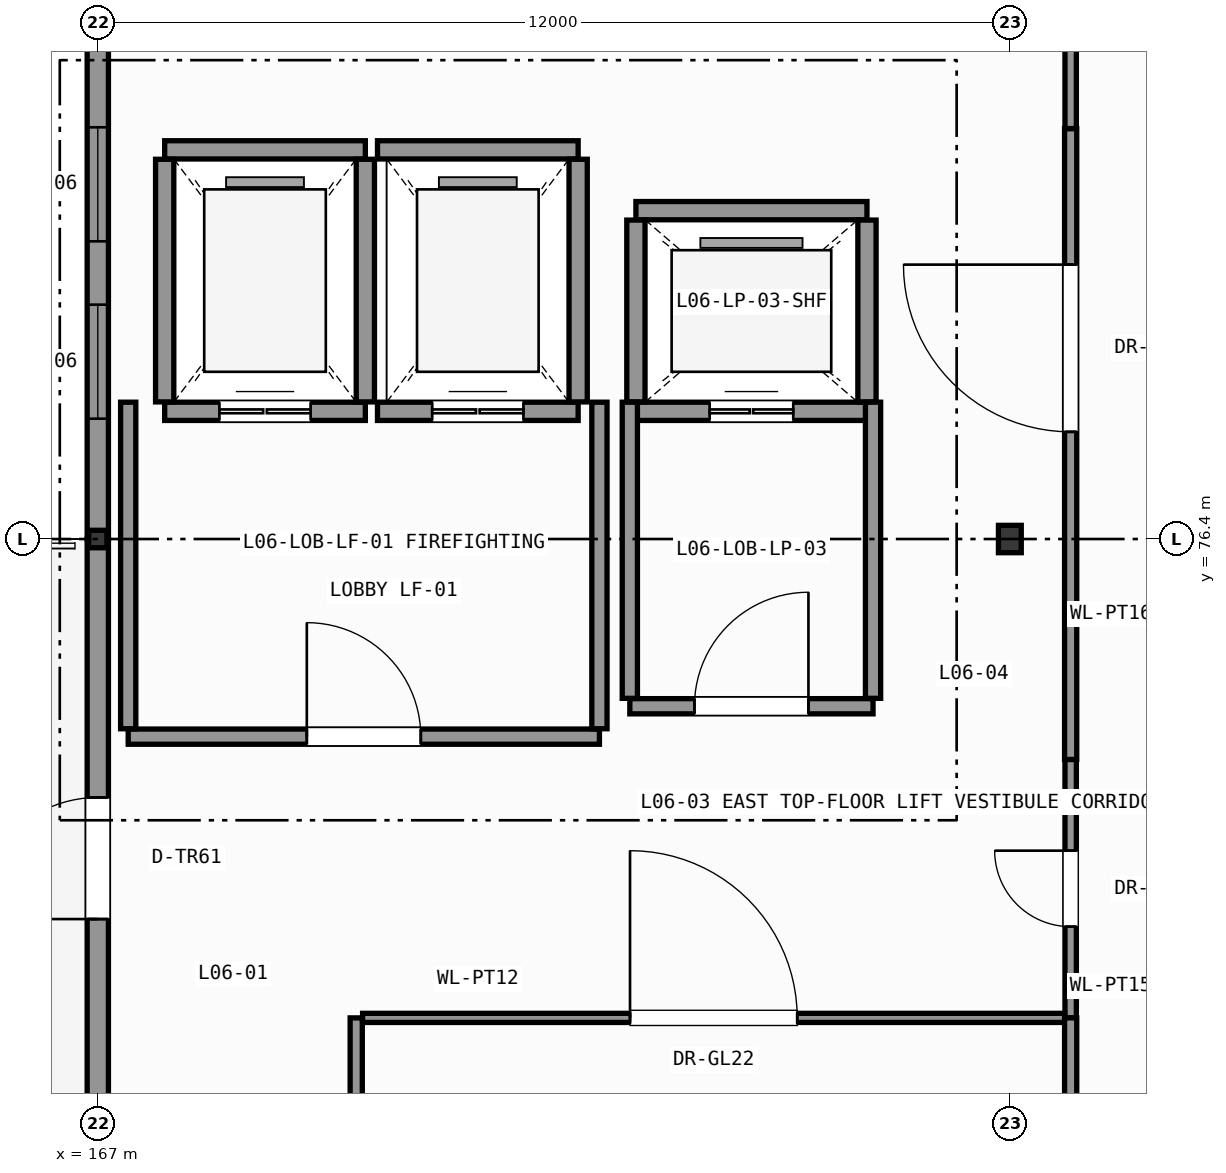
"""IFC4 building model, lengths in metres.
Left out: names, types, materials, properties, quantities, classifications, styles, units other than length and angle.
Written with IfcOpenShell. Run it as: python <this file> out.ifc"""

import sys

from ifc_helpers import new_model, si_unit, direction, frame, frame_2d, origin, origin_2d, place, context, subcontext, project, spatial, rectangle, i_section, extrude, element, fill, save


model = new_model("IFC4")
c1 = context("Model", 3, precision=1e-05, world=origin(), true_north=direction((0.0, 1.0)))
c2 = subcontext(c1, "Body", "Model", "MODEL_VIEW")
j1 = project(units=[si_unit("LENGTHUNIT", "METRE"), si_unit("PLANEANGLEUNIT", "RADIAN")], contexts=[c1])
p1 = place(None, origin())
s1 = spatial("IfcSite", under=j1, at=p1, CompositionType="ELEMENT")
p2 = place(p1, origin())
s2 = spatial("IfcBuilding", under=s1, at=p2, CompositionType="ELEMENT")
p3 = place(p2, frame((0.0, 0.0, 26.4)))
s3 = spatial("IfcBuildingStorey", under=s2, at=p3, CompositionType="ELEMENT", Elevation=26.4)
p4 = place(p3, frame((167.0, 76.4, 0.0), z_axis=(0.0, 0.0, 1.0), x_axis=(1.0, 0.0, 0.0)))
e1 = element("IfcColumn", 1, at=p4, inside=s3, PredefinedType="COLUMN", context=c2, shape_type="SweptSolid", body=[
    extrude(i_section(OverallWidth=0.24, OverallDepth=0.23, WebThickness=0.008, FlangeThickness=0.012, FilletRadius=0.021, at=origin_2d()), origin(), (0.0, 0.0, 1.0), 4.2),
])
p5 = place(p3, frame((179.0, 76.4, 0.0), z_axis=(0.0, 0.0, 1.0), x_axis=(1.0, 0.0, 0.0)))
e2 = element("IfcColumn", 2, at=p5, inside=s3, PredefinedType="COLUMN", context=c2, shape_type="SweptSolid", body=[
    extrude(i_section(OverallWidth=0.3, OverallDepth=0.36, WebThickness=0.012, FlangeThickness=0.022, FilletRadius=0.027, at=origin_2d()), origin(), (0.0, 0.0, 1.0), 4.2),
])
p6 = place(p3, frame((167.0, 76.4, 0.0), z_axis=(0.0, 0.0, 1.0), x_axis=(0.0, 1.0, 0.0)))
e3 = element("IfcWall", 3, at=p6, inside=s3, PredefinedType="SOLIDWALL", context=c2, shape_type="SweptSolid", body=[
    extrude(rectangle(XDim=7.0, YDim=0.28, at=frame_2d((3.5, 0.0))), origin(), (0.0, 0.0, 1.0), 3.695),
])
p7 = place(p6, frame((1.583, 0.0, 0.95)))
e4 = element("IfcOpeningElement", 4, at=p7, cuts=e3, PredefinedType="OPENING", context=c2, shape_type="SweptSolid", body=[
    extrude(rectangle(XDim=1.5, YDim=2.35, at=frame_2d((0.75, 1.175))), frame((0.0, 0.15, 0.0), z_axis=(0.0, -1.0, 0.0), x_axis=(1.0, 0.0, 0.0)), (0.0, 0.0, 1.0), 0.3),
])
p8 = place(p6, frame((3.917, 0.0, 0.95)))
e5 = element("IfcOpeningElement", 5, at=p8, cuts=e3, PredefinedType="OPENING", context=c2, shape_type="SweptSolid", body=[
    extrude(rectangle(XDim=1.5, YDim=2.35, at=frame_2d((0.75, 1.175))), frame((0.0, 0.15, 0.0), z_axis=(0.0, -1.0, 0.0), x_axis=(1.0, 0.0, 0.0)), (0.0, 0.0, 1.0), 0.3),
])
p9 = place(p3, frame((167.0, 68.0, 0.0), z_axis=(0.0, 0.0, 1.0), x_axis=(0.0, 1.0, 0.0)))
e6 = element("IfcWall", 6, at=p9, inside=s3, PredefinedType="SOLIDWALL", context=c2, shape_type="SweptSolid", body=[
    extrude(rectangle(XDim=8.4, YDim=0.28, at=frame_2d((4.2, 0.0))), origin(), (0.0, 0.0, 1.0), 3.545),
])
p10 = place(p9, frame((3.4, 0.0, 0.0)))
e7 = element("IfcOpeningElement", 7, at=p10, cuts=e6, PredefinedType="OPENING", context=c2, shape_type="SweptSolid", body=[
    extrude(rectangle(XDim=1.6, YDim=2.4, at=frame_2d((0.8, 1.2))), frame((0.0, 0.15, 0.0), z_axis=(0.0, -1.0, 0.0), x_axis=(1.0, 0.0, 0.0)), (0.0, 0.0, 1.0), 0.3),
])
p11 = place(p3, frame((167.88, 78.08, 0.0), z_axis=(0.0, 0.0, 1.0), x_axis=(1.0, 0.0, 0.0)))
e8 = element("IfcWall", 8, at=p11, inside=s3, PredefinedType="SHEAR", context=c2, shape_type="SweptSolid", body=[
    extrude(rectangle(XDim=2.64, YDim=0.24, at=frame_2d((1.32, 0.0))), origin(), (0.0, 0.0, 1.0), 4.0),
])
p12 = place(p11, frame((0.72, 0.0, 0.0)))
e9 = element("IfcOpeningElement", 9, at=p12, cuts=e8, PredefinedType="OPENING", context=c2, shape_type="SweptSolid", body=[
    extrude(rectangle(XDim=1.2, YDim=2.2, at=frame_2d((0.6, 1.1))), frame((0.0, 0.13, 0.0), z_axis=(0.0, -1.0, 0.0), x_axis=(1.0, 0.0, 0.0)), (0.0, 0.0, 1.0), 0.26),
])
p13 = place(p3, frame((167.88, 81.52, 0.0), z_axis=(0.0, 0.0, 1.0), x_axis=(1.0, 0.0, 0.0)))
e10 = element("IfcWall", 10, at=p13, inside=s3, PredefinedType="SHEAR", context=c2, shape_type="SweptSolid", body=[
    extrude(rectangle(XDim=2.64, YDim=0.24, at=frame_2d((1.32, 0.0))), origin(), (0.0, 0.0, 1.0), 4.0),
])
for number, where, z_axis, x_axis in (
    (11, (167.88, 78.204, 0.0), (0.0, 0.0, 1.0), (0.0, 1.0, 0.0)),
    (12, (170.52, 78.204, 0.0), (0.0, 0.0, 1.0), (0.0, 1.0, 0.0)),
):
    element("IfcWall", number, at=place(p3, frame(where, z_axis=z_axis, x_axis=x_axis)), inside=s3, PredefinedType="SHEAR", context=c2, shape_type="SweptSolid", body=[
        extrude(rectangle(XDim=3.192, YDim=0.24, at=frame_2d((1.596, 0.0))), origin(), (0.0, 0.0, 1.0), 4.0),
    ])
p14 = place(p3, frame((170.68, 78.08, 0.0), z_axis=(0.0, 0.0, 1.0), x_axis=(1.0, 0.0, 0.0)))
e13 = element("IfcWall", 13, at=p14, inside=s3, PredefinedType="SHEAR", context=c2, shape_type="SweptSolid", body=[
    extrude(rectangle(XDim=2.64, YDim=0.24, at=frame_2d((1.32, 0.0))), origin(), (0.0, 0.0, 1.0), 4.0),
])
p15 = place(p14, frame((0.72, 0.0, 0.0)))
e14 = element("IfcOpeningElement", 14, at=p15, cuts=e13, PredefinedType="OPENING", context=c2, shape_type="SweptSolid", body=[
    extrude(rectangle(XDim=1.2, YDim=2.2, at=frame_2d((0.6, 1.1))), frame((0.0, 0.13, 0.0), z_axis=(0.0, -1.0, 0.0), x_axis=(1.0, 0.0, 0.0)), (0.0, 0.0, 1.0), 0.26),
])
p16 = place(p3, frame((170.68, 81.52, 0.0), z_axis=(0.0, 0.0, 1.0), x_axis=(1.0, 0.0, 0.0)))
e15 = element("IfcWall", 15, at=p16, inside=s3, PredefinedType="SHEAR", context=c2, shape_type="SweptSolid", body=[
    extrude(rectangle(XDim=2.64, YDim=0.24, at=frame_2d((1.32, 0.0))), origin(), (0.0, 0.0, 1.0), 4.0),
])
p17 = place(p3, frame((173.32, 78.204, 0.0), z_axis=(0.0, 0.0, 1.0), x_axis=(0.0, 1.0, 0.0)))
e16 = element("IfcWall", 16, at=p17, inside=s3, PredefinedType="SHEAR", context=c2, shape_type="SweptSolid", body=[
    extrude(rectangle(XDim=3.192, YDim=0.24, at=frame_2d((1.596, 0.0))), origin(), (0.0, 0.0, 1.0), 4.0),
])
p18 = place(p3, frame((174.08, 78.08, 0.0), z_axis=(0.0, 0.0, 1.0), x_axis=(1.0, 0.0, 0.0)))
e17 = element("IfcWall", 17, at=p18, inside=s3, PredefinedType="SHEAR", context=c2, shape_type="SweptSolid", body=[
    extrude(rectangle(XDim=3.04, YDim=0.24, at=frame_2d((1.52, 0.0))), origin(), (0.0, 0.0, 1.0), 4.0),
])
p19 = place(p18, frame((0.97, 0.0, 0.0)))
e18 = element("IfcOpeningElement", 18, at=p19, cuts=e17, PredefinedType="OPENING", context=c2, shape_type="SweptSolid", body=[
    extrude(rectangle(XDim=1.1, YDim=2.2, at=frame_2d((0.55, 1.1))), frame((0.0, 0.13, 0.0), z_axis=(0.0, -1.0, 0.0), x_axis=(1.0, 0.0, 0.0)), (0.0, 0.0, 1.0), 0.26),
])
p20 = place(p3, frame((174.08, 80.72, 0.0), z_axis=(0.0, 0.0, 1.0), x_axis=(1.0, 0.0, 0.0)))
e19 = element("IfcWall", 19, at=p20, inside=s3, PredefinedType="SHEAR", context=c2, shape_type="SweptSolid", body=[
    extrude(rectangle(XDim=3.04, YDim=0.24, at=frame_2d((1.52, 0.0))), origin(), (0.0, 0.0, 1.0), 4.0),
])
for number, where, z_axis, x_axis in (
    (20, (174.08, 78.204, 0.0), (0.0, 0.0, 1.0), (0.0, 1.0, 0.0)),
    (21, (177.12, 78.204, 0.0), (0.0, 0.0, 1.0), (0.0, 1.0, 0.0)),
):
    element("IfcWall", number, at=place(p3, frame(where, z_axis=z_axis, x_axis=x_axis)), inside=s3, PredefinedType="SHEAR", context=c2, shape_type="SweptSolid", body=[
        extrude(rectangle(XDim=2.392, YDim=0.24, at=frame_2d((1.196, 0.0))), origin(), (0.0, 0.0, 1.0), 4.0),
    ])
p21 = place(p3, frame((167.4, 73.8, 0.0), z_axis=(0.0, 0.0, 1.0), x_axis=(1.0, 0.0, 0.0)))
e22 = element("IfcWall", 22, at=p21, inside=s3, PredefinedType="PARTITIONING", context=c2, shape_type="SweptSolid", body=[
    extrude(rectangle(XDim=6.2, YDim=0.2, at=frame_2d((3.1, 0.0))), origin(), (0.0, 0.0, 1.0), 3.625),
])
p22 = place(p21, frame((2.35, 0.0, 0.0)))
e23 = element("IfcOpeningElement", 23, at=p22, cuts=e22, PredefinedType="OPENING", context=c2, shape_type="SweptSolid", body=[
    extrude(rectangle(XDim=1.5, YDim=2.2, at=frame_2d((0.75, 1.1))), frame((0.0, 0.11, 0.0), z_axis=(0.0, -1.0, 0.0), x_axis=(1.0, 0.0, 0.0)), (0.0, 0.0, 1.0), 0.22),
])
for number, where, z_axis, x_axis in (
    (24, (167.4, 73.904, 0.0), (0.0, 0.0, 1.0), (0.0, 1.0, 0.0)),
    (25, (173.6, 73.904, 0.0), (0.0, 0.0, 1.0), (0.0, 1.0, 0.0)),
):
    element("IfcWall", number, at=place(p3, frame(where, z_axis=z_axis, x_axis=x_axis)), inside=s3, PredefinedType="PARTITIONING", context=c2, shape_type="SweptSolid", body=[
        extrude(rectangle(XDim=4.296, YDim=0.2, at=frame_2d((2.148, 0.0))), origin(), (0.0, 0.0, 1.0), 4.0),
    ])
p23 = place(p3, frame((174.0, 74.2, 0.0), z_axis=(0.0, 0.0, 1.0), x_axis=(1.0, 0.0, 0.0)))
e26 = element("IfcWall", 26, at=p23, inside=s3, PredefinedType="PARTITIONING", context=c2, shape_type="SweptSolid", body=[
    extrude(rectangle(XDim=3.2, YDim=0.2, at=frame_2d((1.6, 0.0))), origin(), (0.0, 0.0, 1.0), 4.0),
])
p24 = place(p23, frame((0.85, 0.0, 0.0)))
e27 = element("IfcOpeningElement", 27, at=p24, cuts=e26, PredefinedType="OPENING", context=c2, shape_type="SweptSolid", body=[
    extrude(rectangle(XDim=1.5, YDim=2.2, at=frame_2d((0.75, 1.1))), frame((0.0, 0.11, 0.0), z_axis=(0.0, -1.0, 0.0), x_axis=(1.0, 0.0, 0.0)), (0.0, 0.0, 1.0), 0.22),
])
for number, where, z_axis, x_axis in (
    (28, (174.0, 74.304, 0.0), (0.0, 0.0, 1.0), (0.0, 1.0, 0.0)),
    (29, (177.2, 74.304, 0.0), (0.0, 0.0, 1.0), (0.0, 1.0, 0.0)),
):
    element("IfcWall", number, at=place(p3, frame(where, z_axis=z_axis, x_axis=x_axis)), inside=s3, PredefinedType="PARTITIONING", context=c2, shape_type="SweptSolid", body=[
        extrude(rectangle(XDim=3.896, YDim=0.2, at=frame_2d((1.948, 0.0))), origin(), (0.0, 0.0, 1.0), 4.0),
    ])
p25 = place(p3, frame((170.4, 57.4, 0.0), z_axis=(0.0, 0.0, 1.0), x_axis=(0.0, 1.0, 0.0)))
e30 = element("IfcWall", 30, at=p25, inside=s3, PredefinedType="PARTITIONING", context=c2, shape_type="SweptSolid", body=[
    extrude(rectangle(XDim=12.7, YDim=0.16, at=frame_2d((6.35, 0.0))), origin(), (0.0, 0.0, 1.0), 4.0),
])
p26 = place(p25, frame((5.25, 0.0, 0.0)))
e31 = element("IfcOpeningElement", 31, at=p26, cuts=e30, PredefinedType="OPENING", context=c2, shape_type="SweptSolid", body=[
    extrude(rectangle(XDim=2.2, YDim=2.6, at=frame_2d((1.1, 1.3))), frame((0.0, 0.09, 0.0), z_axis=(0.0, -1.0, 0.0), x_axis=(1.0, 0.0, 0.0)), (0.0, 0.0, 1.0), 0.18),
])
p27 = place(p3, frame((179.8, 70.1, 0.0), z_axis=(0.0, 0.0, 1.0), x_axis=(0.0, 1.0, 0.0)))
e32 = element("IfcWall", 32, at=p27, inside=s3, PredefinedType="PARTITIONING", context=c2, shape_type="SweptSolid", body=[
    extrude(rectangle(XDim=3.4, YDim=0.15, at=frame_2d((1.7, 0.0))), origin(), (0.0, 0.0, 1.0), 4.0),
])
p28 = place(p27, frame((1.2, 0.0, 0.0)))
e33 = element("IfcOpeningElement", 33, at=p28, cuts=e32, PredefinedType="OPENING", context=c2, shape_type="SweptSolid", body=[
    extrude(rectangle(XDim=1.0, YDim=2.15, at=frame_2d((0.5, 1.075))), frame((0.0, 0.085, 0.0), z_axis=(0.0, -1.0, 0.0), x_axis=(1.0, 0.0, 0.0)), (0.0, 0.0, 1.0), 0.17),
])
p29 = place(p3, frame((170.484, 70.1, 0.0), z_axis=(0.0, 0.0, 1.0), x_axis=(1.0, 0.0, 0.0)))
e34 = element("IfcWall", 34, at=p29, inside=s3, PredefinedType="PARTITIONING", context=c2, shape_type="SweptSolid", body=[
    extrude(rectangle(XDim=9.237, YDim=0.12, at=frame_2d((4.619, 0.0))), origin(), (0.0, 0.0, 1.0), 4.0),
])
p30 = place(p29, frame((3.519, 0.0, 0.0)))
e35 = element("IfcOpeningElement", 35, at=p30, cuts=e34, PredefinedType="OPENING", context=c2, shape_type="SweptSolid", body=[
    extrude(rectangle(XDim=2.2, YDim=2.6, at=frame_2d((1.1, 1.3))), frame((0.0, 0.07, 0.0), z_axis=(0.0, -1.0, 0.0), x_axis=(1.0, 0.0, 0.0)), (0.0, 0.0, 1.0), 0.14),
])
p31 = place(p3, frame((179.8, 73.5, 0.0), z_axis=(0.0, 0.0, 1.0), x_axis=(0.0, 1.0, 0.0)))
e36 = element("IfcWall", 36, at=p31, inside=s3, PredefinedType="PARTITIONING", context=c2, shape_type="SweptSolid", body=[
    extrude(rectangle(XDim=8.3, YDim=0.16, at=frame_2d((4.15, 0.0))), origin(), (0.0, 0.0, 1.0), 4.0),
])
p32 = place(p31, frame((4.31, 0.0, 0.0)))
e37 = element("IfcOpeningElement", 37, at=p32, cuts=e36, PredefinedType="OPENING", context=c2, shape_type="SweptSolid", body=[
    extrude(rectangle(XDim=2.2, YDim=2.6, at=frame_2d((1.1, 1.3))), frame((0.0, 0.09, 0.0), z_axis=(0.0, -1.0, 0.0), x_axis=(1.0, 0.0, 0.0)), (0.0, 0.0, 1.0), 0.18),
])
p33 = place(p3, frame((179.8, 81.8, 0.0), z_axis=(0.0, 0.0, 1.0), x_axis=(0.0, 1.0, 0.0)))
e38 = element("IfcWall", 38, at=p33, inside=s3, PredefinedType="PARTITIONING", context=c2, shape_type="SweptSolid", body=[
    extrude(rectangle(XDim=3.4, YDim=0.15, at=frame_2d((1.7, 0.0))), origin(), (0.0, 0.0, 1.0), 4.0),
])
p34 = place(p3, frame((179.8, 57.4, 0.0), z_axis=(0.0, 0.0, 1.0), x_axis=(0.0, 1.0, 0.0)))
e39 = element("IfcWall", 39, at=p34, inside=s3, PredefinedType="PARTITIONING", context=c2, shape_type="SweptSolid", body=[
    extrude(rectangle(XDim=12.7, YDim=0.16, at=frame_2d((6.35, 0.0))), origin(), (0.0, 0.0, 1.0), 4.0),
])
p35 = place(p34, frame((5.25, 0.0, 0.0)))
e40 = element("IfcOpeningElement", 40, at=p35, cuts=e39, PredefinedType="OPENING", context=c2, shape_type="SweptSolid", body=[
    extrude(rectangle(XDim=2.2, YDim=2.6, at=frame_2d((1.1, 1.3))), frame((0.0, 0.09, 0.0), z_axis=(0.0, -1.0, 0.0), x_axis=(1.0, 0.0, 0.0)), (0.0, 0.0, 1.0), 0.18),
])
p36 = place(p7, origin())
e41 = element("IfcWindow", 41, at=p36, inside=s3, PartitioningType="SINGLE_PANEL", PredefinedType="WINDOW", context=c2, shape_type="SweptSolid", body=[
    extrude(rectangle(XDim=1.5, YDim=2.35, at=frame_2d((0.75, 1.175))), frame((0.0, 0.03, 0.0), z_axis=(0.0, -1.0, 0.0), x_axis=(1.0, 0.0, 0.0)), (0.0, 0.0, 1.0), 0.06),
])
fill(e4, e41)
p37 = place(p8, origin())
e42 = element("IfcWindow", 42, at=p37, inside=s3, PartitioningType="SINGLE_PANEL", PredefinedType="WINDOW", context=c2, shape_type="SweptSolid", body=[
    extrude(rectangle(XDim=1.5, YDim=2.35, at=frame_2d((0.75, 1.175))), frame((0.0, 0.03, 0.0), z_axis=(0.0, -1.0, 0.0), x_axis=(1.0, 0.0, 0.0)), (0.0, 0.0, 1.0), 0.06),
])
fill(e5, e42)
p38 = place(p10, origin())
e43 = element("IfcDoor", 43, at=p38, inside=s3, OperationType="SINGLE_SWING_LEFT", PredefinedType="DOOR", context=c2, shape_type="SweptSolid", body=[
    extrude(rectangle(XDim=1.6, YDim=2.4, at=frame_2d((0.8, 1.2))), frame((0.0, 0.025, 0.0), z_axis=(0.0, -1.0, 0.0), x_axis=(1.0, 0.0, 0.0)), (0.0, 0.0, 1.0), 0.05),
])
fill(e7, e43)
p39 = place(p12, origin())
e44 = element("IfcDoor", 44, at=p39, inside=s3, OperationType="DOUBLE_DOOR_SLIDING", PredefinedType="DOOR", context=c2, shape_type="SweptSolid", body=[
    extrude(rectangle(XDim=1.2, YDim=2.2, at=frame_2d((0.6, 1.1))), frame((0.0, 0.025, 0.0), z_axis=(0.0, -1.0, 0.0), x_axis=(1.0, 0.0, 0.0)), (0.0, 0.0, 1.0), 0.05),
])
fill(e9, e44)
p40 = place(p15, origin())
e45 = element("IfcDoor", 45, at=p40, inside=s3, OperationType="DOUBLE_DOOR_SLIDING", PredefinedType="DOOR", context=c2, shape_type="SweptSolid", body=[
    extrude(rectangle(XDim=1.2, YDim=2.2, at=frame_2d((0.6, 1.1))), frame((0.0, 0.025, 0.0), z_axis=(0.0, -1.0, 0.0), x_axis=(1.0, 0.0, 0.0)), (0.0, 0.0, 1.0), 0.05),
])
fill(e14, e45)
p41 = place(p19, origin())
e46 = element("IfcDoor", 46, at=p41, inside=s3, OperationType="DOUBLE_DOOR_SLIDING", PredefinedType="DOOR", context=c2, shape_type="SweptSolid", body=[
    extrude(rectangle(XDim=1.1, YDim=2.2, at=frame_2d((0.55, 1.1))), frame((0.0, 0.025, 0.0), z_axis=(0.0, -1.0, 0.0), x_axis=(1.0, 0.0, 0.0)), (0.0, 0.0, 1.0), 0.05),
])
fill(e18, e46)
p42 = place(p22, origin())
e47 = element("IfcDoor", 47, at=p42, inside=s3, OperationType="SINGLE_SWING_LEFT", PredefinedType="DOOR", context=c2, shape_type="SweptSolid", body=[
    extrude(rectangle(XDim=1.5, YDim=2.2, at=frame_2d((0.75, 1.1))), frame((0.0, 0.025, 0.0), z_axis=(0.0, -1.0, 0.0), x_axis=(1.0, 0.0, 0.0)), (0.0, 0.0, 1.0), 0.05),
])
fill(e23, e47)
p43 = place(p24, origin())
e48 = element("IfcDoor", 48, at=p43, inside=s3, OperationType="SINGLE_SWING_RIGHT", PredefinedType="DOOR", context=c2, shape_type="SweptSolid", body=[
    extrude(rectangle(XDim=1.5, YDim=2.2, at=frame_2d((0.75, 1.1))), frame((0.0, 0.025, 0.0), z_axis=(0.0, -1.0, 0.0), x_axis=(1.0, 0.0, 0.0)), (0.0, 0.0, 1.0), 0.05),
])
fill(e27, e48)
p44 = place(p28, origin())
e49 = element("IfcDoor", 49, at=p44, inside=s3, OperationType="SINGLE_SWING_RIGHT", PredefinedType="DOOR", context=c2, shape_type="SweptSolid", body=[
    extrude(rectangle(XDim=1.0, YDim=2.15, at=frame_2d((0.5, 1.075))), frame((0.0, 0.025, 0.0), z_axis=(0.0, -1.0, 0.0), x_axis=(1.0, 0.0, 0.0)), (0.0, 0.0, 1.0), 0.05),
])
fill(e33, e49)
p45 = place(p30, origin())
e50 = element("IfcDoor", 50, at=p45, inside=s3, OperationType="SINGLE_SWING_LEFT", PredefinedType="DOOR", context=c2, shape_type="SweptSolid", body=[
    extrude(rectangle(XDim=2.2, YDim=2.6, at=frame_2d((1.1, 1.3))), frame((0.0, 0.025, 0.0), z_axis=(0.0, -1.0, 0.0), x_axis=(1.0, 0.0, 0.0)), (0.0, 0.0, 1.0), 0.05),
])
fill(e35, e50)
p46 = place(p32, origin())
e51 = element("IfcDoor", 51, at=p46, inside=s3, OperationType="SINGLE_SWING_RIGHT", PredefinedType="DOOR", context=c2, shape_type="SweptSolid", body=[
    extrude(rectangle(XDim=2.2, YDim=2.6, at=frame_2d((1.1, 1.3))), frame((0.0, 0.025, 0.0), z_axis=(0.0, -1.0, 0.0), x_axis=(1.0, 0.0, 0.0)), (0.0, 0.0, 1.0), 0.05),
])
fill(e37, e51)
save(model, sys.argv[1])
